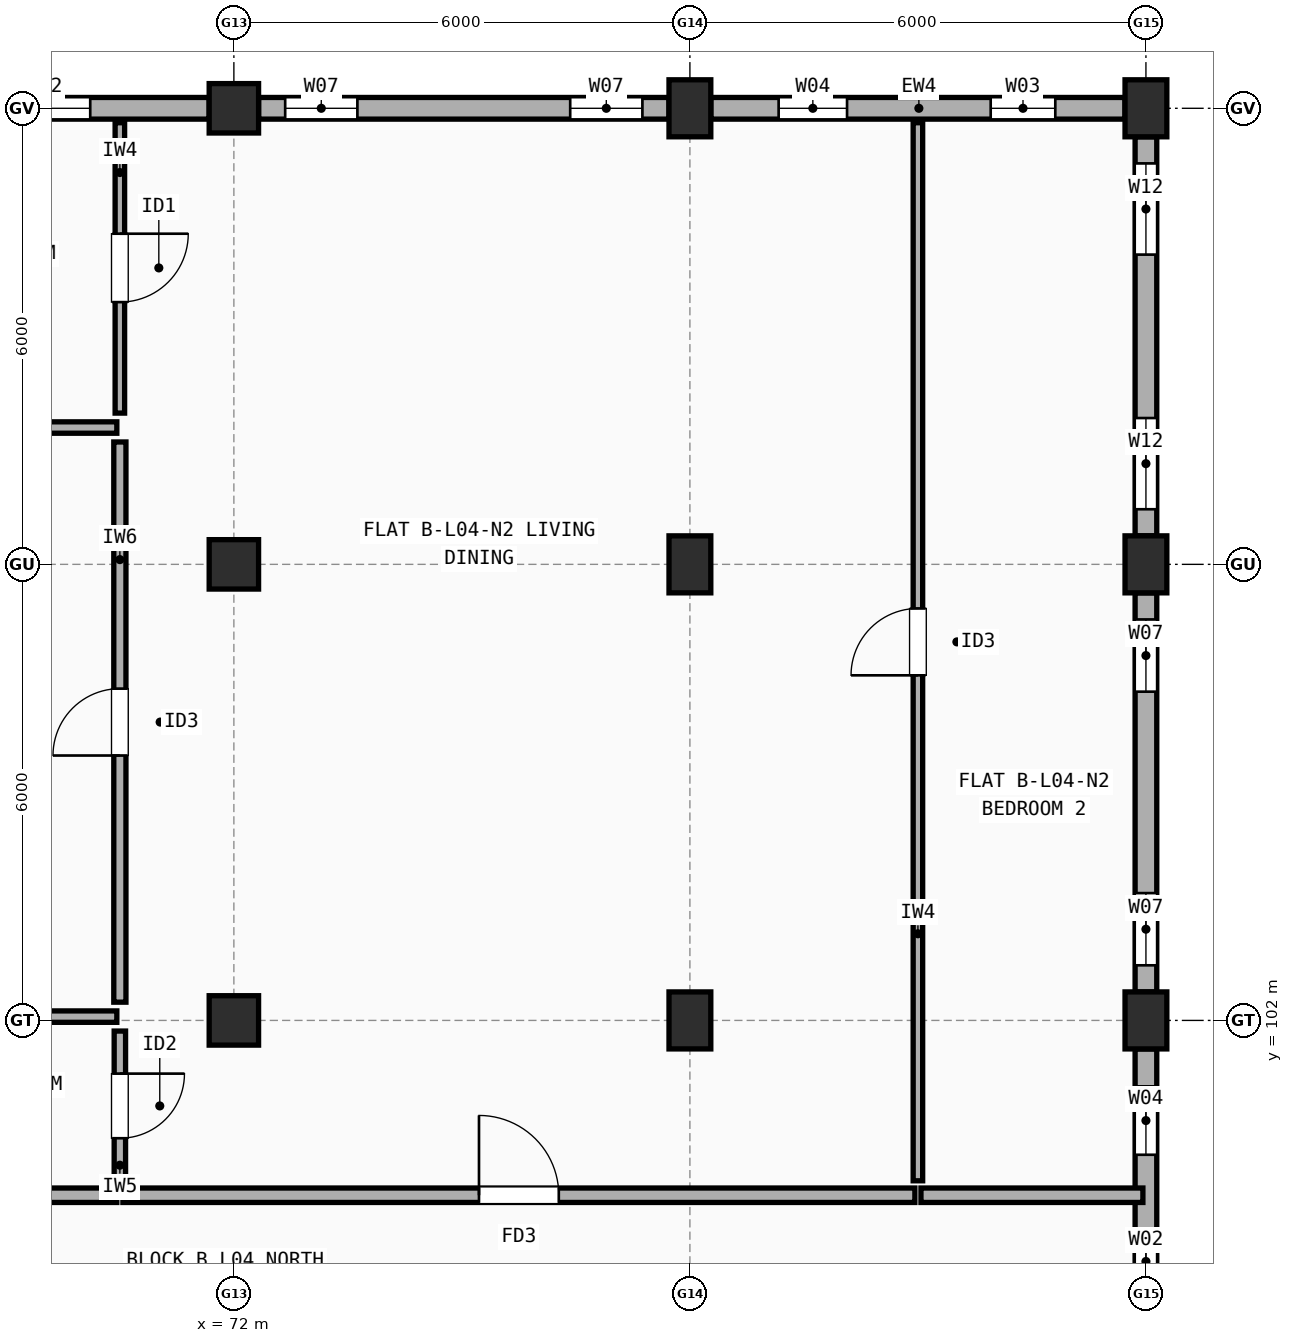
"""IFC4 building model, lengths in metres.
Left out: names, types, materials, properties, quantities, classifications, styles, units other than length and angle.
Written with IfcOpenShell. Run it as: python <this file> out.ifc"""

import sys

from ifc_helpers import new_model, si_unit, direction, frame, frame_2d, origin, origin_2d, place, context, subcontext, project, spatial, rectangle, extrude, element, fill, save


model = new_model("IFC4")
c1 = context("Model", 3, precision=1e-05, world=origin(), true_north=direction((0.0, 1.0)))
c2 = subcontext(c1, "Body", "Model", "MODEL_VIEW")
j1 = project(units=[si_unit("LENGTHUNIT", "METRE"), si_unit("PLANEANGLEUNIT", "RADIAN")], contexts=[c1])
p1 = place(None, origin())
s1 = spatial("IfcSite", under=j1, at=p1, CompositionType="ELEMENT")
p2 = place(p1, origin())
s2 = spatial("IfcBuilding", under=s1, at=p2, CompositionType="ELEMENT")
p3 = place(p2, frame((0.0, 0.0, 14.1)))
s3 = spatial("IfcBuildingStorey", under=s2, at=p3, CompositionType="ELEMENT", Elevation=14.1)
for number, where, z_axis, x_axis in (
    (1, (72.0, 102.0, 0.0), (0.0, 0.0, 1.0), (1.0, 0.0, 0.0)),
    (2, (72.0, 108.0, 0.0), (0.0, 0.0, 1.0), (1.0, 0.0, 0.0)),
    (3, (72.0, 114.0, 0.0), (0.0, 0.0, 1.0), (1.0, 0.0, 0.0)),
):
    element("IfcColumn", number, at=place(p3, frame(where, z_axis=z_axis, x_axis=x_axis)), inside=s3, PredefinedType="COLUMN", context=c2, shape_type="SweptSolid", body=[
        extrude(rectangle(XDim=0.65, YDim=0.65, at=origin_2d()), origin(), (0.0, 0.0, 1.0), 2.95),
    ])
for number, where, z_axis, x_axis in (
    (4, (78.0, 102.0, 0.0), (0.0, 0.0, 1.0), (1.0, 0.0, 0.0)),
    (5, (78.0, 108.0, 0.0), (0.0, 0.0, 1.0), (1.0, 0.0, 0.0)),
    (6, (78.0, 114.0, 0.0), (0.0, 0.0, 1.0), (1.0, 0.0, 0.0)),
    (7, (84.0, 102.0, 0.0), (0.0, 0.0, 1.0), (1.0, 0.0, 0.0)),
    (8, (84.0, 108.0, 0.0), (0.0, 0.0, 1.0), (1.0, 0.0, 0.0)),
    (9, (84.0, 114.0, 0.0), (0.0, 0.0, 1.0), (1.0, 0.0, 0.0)),
):
    element("IfcColumn", number, at=place(p3, frame(where, z_axis=z_axis, x_axis=x_axis)), inside=s3, PredefinedType="COLUMN", context=c2, shape_type="SweptSolid", body=[
        extrude(rectangle(XDim=0.55, YDim=0.75, at=origin_2d()), origin(), (0.0, 0.0, 1.0), 2.95),
    ])
p4 = place(p3, frame((84.0, 96.375, 0.0), z_axis=(0.0, 0.0, 1.0), x_axis=(0.0, 1.0, 0.0)))
e10 = element("IfcWall", 10, at=p4, inside=s3, PredefinedType="STANDARD", context=c2, shape_type="SweptSolid", body=[
    extrude(rectangle(XDim=5.25, YDim=0.285, at=frame_2d((2.625, 0.0))), origin(), (0.0, 0.0, 1.0), 2.432),
])
p5 = place(p4, frame((2.054, 0.0, 0.9)))
e11 = element("IfcOpeningElement", 11, at=p5, cuts=e10, PredefinedType="OPENING", context=c2, shape_type="SweptSolid", body=[
    extrude(rectangle(XDim=0.8, YDim=1.2, at=frame_2d((0.4, 0.6))), frame((0.0, 0.152, 0.0), z_axis=(0.0, -1.0, 0.0), x_axis=(1.0, 0.0, 0.0)), (0.0, 0.0, 1.0), 0.305),
])
p6 = place(p4, frame((3.857, 0.0, 0.9)))
e12 = element("IfcOpeningElement", 12, at=p6, cuts=e10, PredefinedType="OPENING", context=c2, shape_type="SweptSolid", body=[
    extrude(rectangle(XDim=0.9, YDim=1.3, at=frame_2d((0.45, 0.65))), frame((0.0, 0.152, 0.0), z_axis=(0.0, -1.0, 0.0), x_axis=(1.0, 0.0, 0.0)), (0.0, 0.0, 1.0), 0.305),
])
p7 = place(p3, frame((84.0, 102.375, 0.0), z_axis=(0.0, 0.0, 1.0), x_axis=(0.0, 1.0, 0.0)))
e13 = element("IfcWall", 13, at=p7, inside=s3, PredefinedType="STANDARD", context=c2, shape_type="SweptSolid", body=[
    extrude(rectangle(XDim=5.25, YDim=0.285, at=frame_2d((2.625, 0.0))), origin(), (0.0, 0.0, 1.0), 2.432),
])
p8 = place(p7, frame((0.35, 0.0, 0.9)))
e14 = element("IfcOpeningElement", 14, at=p8, cuts=e13, PredefinedType="OPENING", context=c2, shape_type="SweptSolid", body=[
    extrude(rectangle(XDim=0.95, YDim=1.35, at=frame_2d((0.475, 0.675))), frame((0.0, 0.152, 0.0), z_axis=(0.0, -1.0, 0.0), x_axis=(1.0, 0.0, 0.0)), (0.0, 0.0, 1.0), 0.305),
])
p9 = place(p7, frame((3.95, 0.0, 0.9)))
e15 = element("IfcOpeningElement", 15, at=p9, cuts=e13, PredefinedType="OPENING", context=c2, shape_type="SweptSolid", body=[
    extrude(rectangle(XDim=0.95, YDim=1.35, at=frame_2d((0.475, 0.675))), frame((0.0, 0.152, 0.0), z_axis=(0.0, -1.0, 0.0), x_axis=(1.0, 0.0, 0.0)), (0.0, 0.0, 1.0), 0.305),
])
p10 = place(p3, frame((84.0, 108.375, 0.0), z_axis=(0.0, 0.0, 1.0), x_axis=(0.0, 1.0, 0.0)))
e16 = element("IfcWall", 16, at=p10, inside=s3, PredefinedType="STANDARD", context=c2, shape_type="SweptSolid", body=[
    extrude(rectangle(XDim=5.25, YDim=0.285, at=frame_2d((2.625, 0.0))), origin(), (0.0, 0.0, 1.0), 2.432),
])
p11 = place(p10, frame((0.35, 0.0, 0.9)))
e17 = element("IfcOpeningElement", 17, at=p11, cuts=e16, PredefinedType="OPENING", context=c2, shape_type="SweptSolid", body=[
    extrude(rectangle(XDim=1.2, YDim=1.35, at=frame_2d((0.6, 0.675))), frame((0.0, 0.152, 0.0), z_axis=(0.0, -1.0, 0.0), x_axis=(1.0, 0.0, 0.0)), (0.0, 0.0, 1.0), 0.305),
])
p12 = place(p10, frame((3.7, 0.0, 0.9)))
e18 = element("IfcOpeningElement", 18, at=p12, cuts=e16, PredefinedType="OPENING", context=c2, shape_type="SweptSolid", body=[
    extrude(rectangle(XDim=1.2, YDim=1.35, at=frame_2d((0.6, 0.675))), frame((0.0, 0.152, 0.0), z_axis=(0.0, -1.0, 0.0), x_axis=(1.0, 0.0, 0.0)), (0.0, 0.0, 1.0), 0.305),
])
p13 = place(p3, frame((83.725, 114.0, 0.0), z_axis=(0.0, 0.0, 1.0), x_axis=(-1.0, 0.0, 0.0)))
e19 = element("IfcWall", 19, at=p13, inside=s3, PredefinedType="STANDARD", context=c2, shape_type="SweptSolid", body=[
    extrude(rectangle(XDim=5.45, YDim=0.285, at=frame_2d((2.725, 0.0))), origin(), (0.0, 0.0, 1.0), 2.432),
])
p14 = place(p13, frame((0.917, 0.0, 0.9)))
e20 = element("IfcOpeningElement", 20, at=p14, cuts=e19, PredefinedType="OPENING", context=c2, shape_type="SweptSolid", body=[
    extrude(rectangle(XDim=0.85, YDim=1.25, at=frame_2d((0.425, 0.625))), frame((0.0, 0.152, 0.0), z_axis=(0.0, -1.0, 0.0), x_axis=(1.0, 0.0, 0.0)), (0.0, 0.0, 1.0), 0.305),
])
p15 = place(p13, frame((3.657, 0.0, 0.9)))
e21 = element("IfcOpeningElement", 21, at=p15, cuts=e19, PredefinedType="OPENING", context=c2, shape_type="SweptSolid", body=[
    extrude(rectangle(XDim=0.9, YDim=1.3, at=frame_2d((0.45, 0.65))), frame((0.0, 0.152, 0.0), z_axis=(0.0, -1.0, 0.0), x_axis=(1.0, 0.0, 0.0)), (0.0, 0.0, 1.0), 0.305),
])
p16 = place(p3, frame((77.725, 114.0, 0.0), z_axis=(0.0, 0.0, 1.0), x_axis=(-1.0, 0.0, 0.0)))
e22 = element("IfcWall", 22, at=p16, inside=s3, PredefinedType="STANDARD", context=c2, shape_type="SweptSolid", body=[
    extrude(rectangle(XDim=5.4, YDim=0.285, at=frame_2d((2.7, 0.0))), origin(), (0.0, 0.0, 1.0), 2.432),
])
p17 = place(p16, frame((0.35, 0.0, 0.9)))
e23 = element("IfcOpeningElement", 23, at=p17, cuts=e22, PredefinedType="OPENING", context=c2, shape_type="SweptSolid", body=[
    extrude(rectangle(XDim=0.95, YDim=1.35, at=frame_2d((0.475, 0.675))), frame((0.0, 0.152, 0.0), z_axis=(0.0, -1.0, 0.0), x_axis=(1.0, 0.0, 0.0)), (0.0, 0.0, 1.0), 0.305),
])
p18 = place(p16, frame((4.1, 0.0, 0.9)))
e24 = element("IfcOpeningElement", 24, at=p18, cuts=e22, PredefinedType="OPENING", context=c2, shape_type="SweptSolid", body=[
    extrude(rectangle(XDim=0.95, YDim=1.35, at=frame_2d((0.475, 0.675))), frame((0.0, 0.152, 0.0), z_axis=(0.0, -1.0, 0.0), x_axis=(1.0, 0.0, 0.0)), (0.0, 0.0, 1.0), 0.305),
])
p19 = place(p3, frame((71.675, 114.0, 0.0), z_axis=(0.0, 0.0, 1.0), x_axis=(-1.0, 0.0, 0.0)))
e25 = element("IfcWall", 25, at=p19, inside=s3, PredefinedType="STANDARD", context=c2, shape_type="SweptSolid", body=[
    extrude(rectangle(XDim=5.35, YDim=0.285, at=frame_2d((2.675, 0.0))), origin(), (0.0, 0.0, 1.0), 2.432),
])
p20 = place(p19, frame((1.565, 0.0, 0.9)))
e26 = element("IfcOpeningElement", 26, at=p20, cuts=e25, PredefinedType="OPENING", context=c2, shape_type="SweptSolid", body=[
    extrude(rectangle(XDim=1.2, YDim=1.35, at=frame_2d((0.6, 0.675))), frame((0.0, 0.152, 0.0), z_axis=(0.0, -1.0, 0.0), x_axis=(1.0, 0.0, 0.0)), (0.0, 0.0, 1.0), 0.305),
])
p21 = place(p19, frame((3.8, 0.0, 0.9)))
e27 = element("IfcOpeningElement", 27, at=p21, cuts=e25, PredefinedType="OPENING", context=c2, shape_type="SweptSolid", body=[
    extrude(rectangle(XDim=1.2, YDim=1.35, at=frame_2d((0.6, 0.675))), frame((0.0, 0.152, 0.0), z_axis=(0.0, -1.0, 0.0), x_axis=(1.0, 0.0, 0.0)), (0.0, 0.0, 1.0), 0.305),
])
p22 = place(p3, frame((66.04, 99.7, 0.0), z_axis=(0.0, 0.0, 1.0), x_axis=(1.0, 0.0, 0.0)))
e28 = element("IfcWall", 28, at=p22, inside=s3, PredefinedType="SOLIDWALL", context=c2, shape_type="SweptSolid", body=[
    extrude(rectangle(XDim=4.42, YDim=0.19, at=frame_2d((2.21, 0.0))), origin(), (0.0, 0.0, 1.0), 2.95),
])
p23 = place(p3, frame((70.54, 99.7, 0.0), z_axis=(0.0, 0.0, 1.0), x_axis=(1.0, 0.0, 0.0)))
e29 = element("IfcWall", 29, at=p23, inside=s3, PredefinedType="SOLIDWALL", context=c2, shape_type="SweptSolid", body=[
    extrude(rectangle(XDim=10.42, YDim=0.19, at=frame_2d((5.21, 0.0))), origin(), (0.0, 0.0, 1.0), 2.432),
])
p24 = place(p23, frame((4.685, 0.0, 0.0)))
e30 = element("IfcOpeningElement", 30, at=p24, cuts=e29, PredefinedType="OPENING", context=c2, shape_type="SweptSolid", body=[
    extrude(rectangle(XDim=1.05, YDim=2.15, at=frame_2d((0.525, 1.075))), frame((0.0, 0.105, 0.0), z_axis=(0.0, -1.0, 0.0), x_axis=(1.0, 0.0, 0.0)), (0.0, 0.0, 1.0), 0.21),
])
p25 = place(p3, frame((70.5, 109.99, 0.0), z_axis=(0.0, 0.0, 1.0), x_axis=(0.0, 1.0, 0.0)))
e31 = element("IfcWall", 31, at=p25, inside=s3, PredefinedType="PARTITIONING", context=c2, shape_type="SweptSolid", body=[
    extrude(rectangle(XDim=3.82, YDim=0.125, at=frame_2d((1.91, 0.0))), origin(), (0.0, 0.0, 1.0), 2.95),
])
p26 = place(p25, frame((1.46, 0.0, 0.0)))
e32 = element("IfcOpeningElement", 32, at=p26, cuts=e31, PredefinedType="OPENING", context=c2, shape_type="SweptSolid", body=[
    extrude(rectangle(XDim=0.9, YDim=2.1, at=frame_2d((0.45, 1.05))), frame((0.0, 0.073, 0.0), z_axis=(0.0, -1.0, 0.0), x_axis=(1.0, 0.0, 0.0)), (0.0, 0.0, 1.0), 0.145),
])
p27 = place(p3, frame((70.5, 102.24, 0.0), z_axis=(0.0, 0.0, 1.0), x_axis=(0.0, 1.0, 0.0)))
e33 = element("IfcWall", 33, at=p27, inside=s3, PredefinedType="PLUMBINGWALL", context=c2, shape_type="SweptSolid", body=[
    extrude(rectangle(XDim=7.37, YDim=0.16, at=frame_2d((3.685, 0.0))), origin(), (0.0, 0.0, 1.0), 2.432),
])
p28 = place(p27, frame((3.245, 0.0, 0.0)))
e34 = element("IfcOpeningElement", 34, at=p28, cuts=e33, PredefinedType="OPENING", context=c2, shape_type="SweptSolid", body=[
    extrude(rectangle(XDim=0.88, YDim=2.1, at=frame_2d((0.44, 1.05))), frame((0.0, 0.09, 0.0), z_axis=(0.0, -1.0, 0.0), x_axis=(1.0, 0.0, 0.0)), (0.0, 0.0, 1.0), 0.18),
])
p29 = place(p3, frame((70.5, 99.89, 0.0), z_axis=(0.0, 0.0, 1.0), x_axis=(0.0, 1.0, 0.0)))
e35 = element("IfcWall", 35, at=p29, inside=s3, PredefinedType="PARTITIONING", context=c2, shape_type="SweptSolid", body=[
    extrude(rectangle(XDim=1.97, YDim=0.15, at=frame_2d((0.985, 0.0))), origin(), (0.0, 0.0, 1.0), 2.95),
])
p30 = place(p29, frame((0.56, 0.0, 0.0)))
e36 = element("IfcOpeningElement", 36, at=p30, cuts=e35, PredefinedType="OPENING", context=c2, shape_type="SweptSolid", body=[
    extrude(rectangle(XDim=0.85, YDim=2.1, at=frame_2d((0.425, 1.05))), frame((0.0, 0.085, 0.0), z_axis=(0.0, -1.0, 0.0), x_axis=(1.0, 0.0, 0.0)), (0.0, 0.0, 1.0), 0.17),
])
p31 = place(p3, frame((66.04, 109.8, 0.0), z_axis=(0.0, 0.0, 1.0), x_axis=(1.0, 0.0, 0.0)))
e37 = element("IfcWall", 37, at=p31, inside=s3, PredefinedType="PARTITIONING", context=c2, shape_type="SweptSolid", body=[
    extrude(rectangle(XDim=4.42, YDim=0.15, at=frame_2d((2.21, 0.0))), origin(), (0.0, 0.0, 1.0), 2.458),
])
p32 = place(p3, frame((66.36, 102.05, 0.0), z_axis=(0.0, 0.0, 1.0), x_axis=(1.0, 0.0, 0.0)))
e38 = element("IfcWall", 38, at=p32, inside=s3, PredefinedType="PARTITIONING", context=c2, shape_type="SweptSolid", body=[
    extrude(rectangle(XDim=4.1, YDim=0.15, at=frame_2d((2.05, 0.0))), origin(), (0.0, 0.0, 1.0), 2.432),
])
p33 = place(p3, frame((81.04, 99.7, 0.0), z_axis=(0.0, 0.0, 1.0), x_axis=(1.0, 0.0, 0.0)))
e39 = element("IfcWall", 39, at=p33, inside=s3, PredefinedType="SOLIDWALL", context=c2, shape_type="SweptSolid", body=[
    extrude(rectangle(XDim=2.92, YDim=0.19, at=frame_2d((1.46, 0.0))), origin(), (0.0, 0.0, 1.0), 2.432),
])
p34 = place(p3, frame((81.0, 99.89, 0.0), z_axis=(0.0, 0.0, 1.0), x_axis=(0.0, 1.0, 0.0)))
e40 = element("IfcWall", 40, at=p34, inside=s3, PredefinedType="PARTITIONING", context=c2, shape_type="SweptSolid", body=[
    extrude(rectangle(XDim=13.92, YDim=0.125, at=frame_2d((6.96, 0.0))), origin(), (0.0, 0.0, 1.0), 2.432),
])
p35 = place(p34, frame((6.65, 0.0, 0.0)))
e41 = element("IfcOpeningElement", 41, at=p35, cuts=e40, PredefinedType="OPENING", context=c2, shape_type="SweptSolid", body=[
    extrude(rectangle(XDim=0.88, YDim=2.1, at=frame_2d((0.44, 1.05))), frame((0.0, 0.073, 0.0), z_axis=(0.0, -1.0, 0.0), x_axis=(1.0, 0.0, 0.0)), (0.0, 0.0, 1.0), 0.145),
])
p36 = place(p5, origin())
e42 = element("IfcWindow", 42, at=p36, inside=s3, PartitioningType="SINGLE_PANEL", PredefinedType="WINDOW", context=c2, shape_type="SweptSolid", body=[
    extrude(rectangle(XDim=0.8, YDim=1.2, at=frame_2d((0.4, 0.6))), frame((0.0, 0.03, 0.0), z_axis=(0.0, -1.0, 0.0), x_axis=(1.0, 0.0, 0.0)), (0.0, 0.0, 1.0), 0.06),
])
fill(e11, e42)
p37 = place(p6, origin())
e43 = element("IfcWindow", 43, at=p37, inside=s3, PartitioningType="SINGLE_PANEL", PredefinedType="WINDOW", context=c2, shape_type="SweptSolid", body=[
    extrude(rectangle(XDim=0.9, YDim=1.3, at=frame_2d((0.45, 0.65))), frame((0.0, 0.03, 0.0), z_axis=(0.0, -1.0, 0.0), x_axis=(1.0, 0.0, 0.0)), (0.0, 0.0, 1.0), 0.06),
])
fill(e12, e43)
p38 = place(p8, origin())
e44 = element("IfcWindow", 44, at=p38, inside=s3, PartitioningType="SINGLE_PANEL", PredefinedType="WINDOW", context=c2, shape_type="SweptSolid", body=[
    extrude(rectangle(XDim=0.95, YDim=1.35, at=frame_2d((0.475, 0.675))), frame((0.0, 0.03, 0.0), z_axis=(0.0, -1.0, 0.0), x_axis=(1.0, 0.0, 0.0)), (0.0, 0.0, 1.0), 0.06),
])
fill(e14, e44)
p39 = place(p9, origin())
e45 = element("IfcWindow", 45, at=p39, inside=s3, PartitioningType="SINGLE_PANEL", PredefinedType="WINDOW", context=c2, shape_type="SweptSolid", body=[
    extrude(rectangle(XDim=0.95, YDim=1.35, at=frame_2d((0.475, 0.675))), frame((0.0, 0.03, 0.0), z_axis=(0.0, -1.0, 0.0), x_axis=(1.0, 0.0, 0.0)), (0.0, 0.0, 1.0), 0.06),
])
fill(e15, e45)
p40 = place(p11, origin())
e46 = element("IfcWindow", 46, at=p40, inside=s3, PartitioningType="SINGLE_PANEL", PredefinedType="WINDOW", context=c2, shape_type="SweptSolid", body=[
    extrude(rectangle(XDim=1.2, YDim=1.35, at=frame_2d((0.6, 0.675))), frame((0.0, 0.03, 0.0), z_axis=(0.0, -1.0, 0.0), x_axis=(1.0, 0.0, 0.0)), (0.0, 0.0, 1.0), 0.06),
])
fill(e17, e46)
p41 = place(p12, origin())
e47 = element("IfcWindow", 47, at=p41, inside=s3, PartitioningType="SINGLE_PANEL", PredefinedType="WINDOW", context=c2, shape_type="SweptSolid", body=[
    extrude(rectangle(XDim=1.2, YDim=1.35, at=frame_2d((0.6, 0.675))), frame((0.0, 0.03, 0.0), z_axis=(0.0, -1.0, 0.0), x_axis=(1.0, 0.0, 0.0)), (0.0, 0.0, 1.0), 0.06),
])
fill(e18, e47)
p42 = place(p14, origin())
e48 = element("IfcWindow", 48, at=p42, inside=s3, PartitioningType="SINGLE_PANEL", PredefinedType="WINDOW", context=c2, shape_type="SweptSolid", body=[
    extrude(rectangle(XDim=0.85, YDim=1.25, at=frame_2d((0.425, 0.625))), frame((0.0, 0.03, 0.0), z_axis=(0.0, -1.0, 0.0), x_axis=(1.0, 0.0, 0.0)), (0.0, 0.0, 1.0), 0.06),
])
fill(e20, e48)
p43 = place(p15, origin())
e49 = element("IfcWindow", 49, at=p43, inside=s3, PartitioningType="SINGLE_PANEL", PredefinedType="WINDOW", context=c2, shape_type="SweptSolid", body=[
    extrude(rectangle(XDim=0.9, YDim=1.3, at=frame_2d((0.45, 0.65))), frame((0.0, 0.03, 0.0), z_axis=(0.0, -1.0, 0.0), x_axis=(1.0, 0.0, 0.0)), (0.0, 0.0, 1.0), 0.06),
])
fill(e21, e49)
p44 = place(p17, origin())
e50 = element("IfcWindow", 50, at=p44, inside=s3, PartitioningType="SINGLE_PANEL", PredefinedType="WINDOW", context=c2, shape_type="SweptSolid", body=[
    extrude(rectangle(XDim=0.95, YDim=1.35, at=frame_2d((0.475, 0.675))), frame((0.0, 0.03, 0.0), z_axis=(0.0, -1.0, 0.0), x_axis=(1.0, 0.0, 0.0)), (0.0, 0.0, 1.0), 0.06),
])
fill(e23, e50)
p45 = place(p18, origin())
e51 = element("IfcWindow", 51, at=p45, inside=s3, PartitioningType="SINGLE_PANEL", PredefinedType="WINDOW", context=c2, shape_type="SweptSolid", body=[
    extrude(rectangle(XDim=0.95, YDim=1.35, at=frame_2d((0.475, 0.675))), frame((0.0, 0.03, 0.0), z_axis=(0.0, -1.0, 0.0), x_axis=(1.0, 0.0, 0.0)), (0.0, 0.0, 1.0), 0.06),
])
fill(e24, e51)
p46 = place(p20, origin())
e52 = element("IfcWindow", 52, at=p46, inside=s3, PartitioningType="SINGLE_PANEL", PredefinedType="WINDOW", context=c2, shape_type="SweptSolid", body=[
    extrude(rectangle(XDim=1.2, YDim=1.35, at=frame_2d((0.6, 0.675))), frame((0.0, 0.03, 0.0), z_axis=(0.0, -1.0, 0.0), x_axis=(1.0, 0.0, 0.0)), (0.0, 0.0, 1.0), 0.06),
])
fill(e26, e52)
p47 = place(p24, origin())
e53 = element("IfcDoor", 53, at=p47, inside=s3, OperationType="SINGLE_SWING_LEFT", PredefinedType="DOOR", context=c2, shape_type="SweptSolid", body=[
    extrude(rectangle(XDim=1.05, YDim=2.15, at=frame_2d((0.525, 1.075))), frame((0.0, 0.025, 0.0), z_axis=(0.0, -1.0, 0.0), x_axis=(1.0, 0.0, 0.0)), (0.0, 0.0, 1.0), 0.05),
])
fill(e30, e53)
p48 = place(p26, origin())
e54 = element("IfcDoor", 54, at=p48, inside=s3, OperationType="SINGLE_SWING_RIGHT", PredefinedType="DOOR", context=c2, shape_type="SweptSolid", body=[
    extrude(rectangle(XDim=0.9, YDim=2.1, at=frame_2d((0.45, 1.05))), frame((0.0, 0.025, 0.0), z_axis=(0.0, -1.0, 0.0), x_axis=(1.0, 0.0, 0.0)), (0.0, 0.0, 1.0), 0.05),
])
fill(e32, e54)
p49 = place(p28, origin())
e55 = element("IfcDoor", 55, at=p49, inside=s3, OperationType="SINGLE_SWING_LEFT", PredefinedType="DOOR", context=c2, shape_type="SweptSolid", body=[
    extrude(rectangle(XDim=0.88, YDim=2.1, at=frame_2d((0.44, 1.05))), frame((0.0, 0.025, 0.0), z_axis=(0.0, -1.0, 0.0), x_axis=(1.0, 0.0, 0.0)), (0.0, 0.0, 1.0), 0.05),
])
fill(e34, e55)
p50 = place(p30, origin())
e56 = element("IfcDoor", 56, at=p50, inside=s3, OperationType="SINGLE_SWING_RIGHT", PredefinedType="DOOR", context=c2, shape_type="SweptSolid", body=[
    extrude(rectangle(XDim=0.85, YDim=2.1, at=frame_2d((0.425, 1.05))), frame((0.0, 0.025, 0.0), z_axis=(0.0, -1.0, 0.0), x_axis=(1.0, 0.0, 0.0)), (0.0, 0.0, 1.0), 0.05),
])
fill(e36, e56)
p51 = place(p35, origin())
e57 = element("IfcDoor", 57, at=p51, inside=s3, OperationType="SINGLE_SWING_LEFT", PredefinedType="DOOR", context=c2, shape_type="SweptSolid", body=[
    extrude(rectangle(XDim=0.88, YDim=2.1, at=frame_2d((0.44, 1.05))), frame((0.0, 0.025, 0.0), z_axis=(0.0, -1.0, 0.0), x_axis=(1.0, 0.0, 0.0)), (0.0, 0.0, 1.0), 0.05),
])
fill(e41, e57)
save(model, sys.argv[1])
